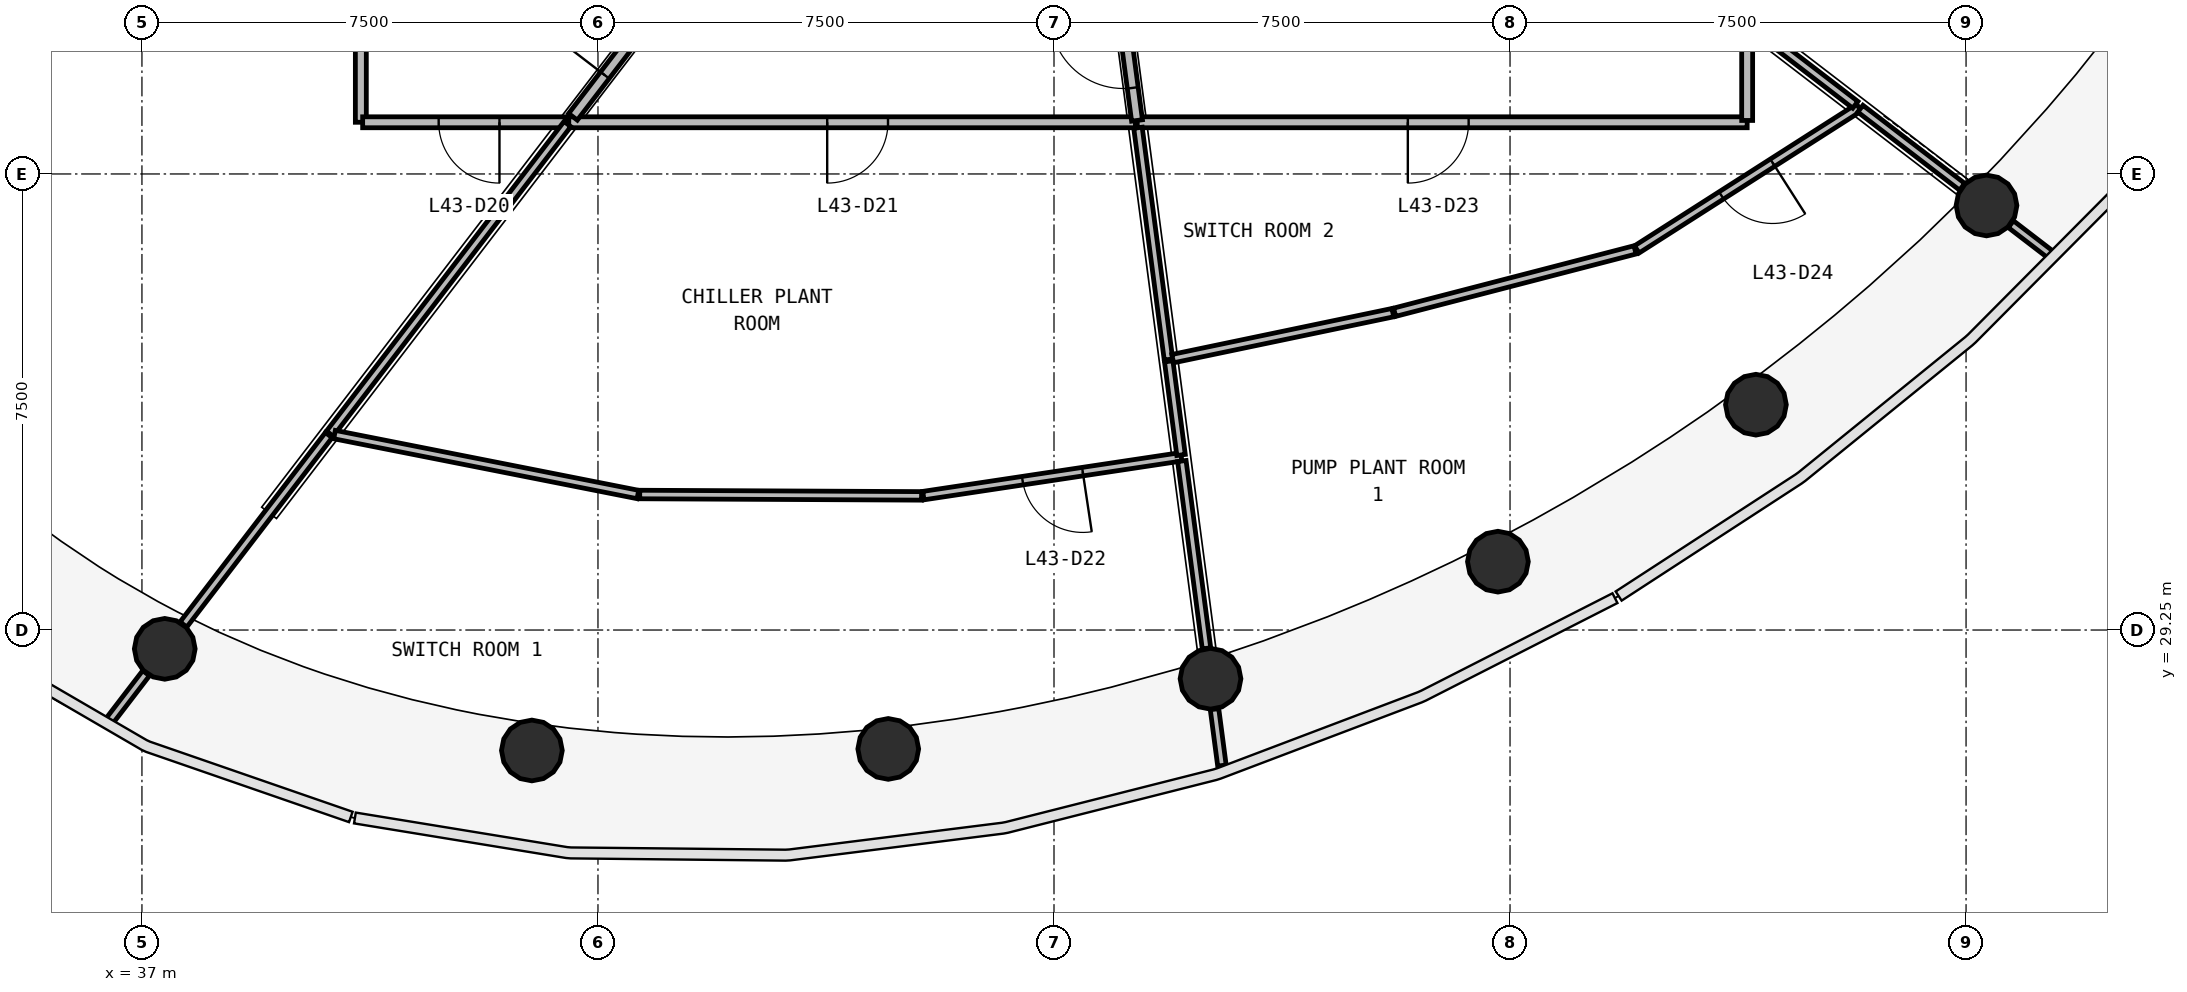
"""IFC4 building model, lengths in metres.
Left out: names, types, materials, properties, quantities, classifications, styles, units other than length and angle.
Written with IfcOpenShell. Run it as: python <this file> out.ifc"""

import sys

from ifc_helpers import new_model, si_unit, direction, frame, frame_2d, origin, origin_2d, place, context, subcontext, project, spatial, rectangle, circle, extrude, source, transform, mapped, element, fill, save


model = new_model("IFC4")
c1 = context("Model", 3, precision=1e-05, world=origin(), true_north=direction((0.0, 1.0)))
c2 = subcontext(c1, "Body", "Model", "MODEL_VIEW")
j1 = project(units=[si_unit("LENGTHUNIT", "METRE"), si_unit("PLANEANGLEUNIT", "RADIAN")], contexts=[c1])
p1 = place(None, origin())
s1 = spatial("IfcSite", under=j1, at=p1, CompositionType="ELEMENT")
p2 = place(p1, origin())
s2 = spatial("IfcBuilding", under=s1, at=p2, CompositionType="ELEMENT")
p3 = place(p2, frame((0.0, 0.0, 179.9)))
s3 = spatial("IfcBuildingStorey", under=s2, at=p3, CompositionType="ELEMENT", Elevation=179.9)
m1 = source(origin(), c2, "Body", "SweptSolid", [
    extrude(circle(Radius=0.5, at=origin_2d()), origin(), (0.0, 0.0, 1.0), 3.58),
])
for number, where, z_axis, x_axis in (
    (1, (37.375, 28.94, 0.0), (0.0, 0.0, 1.0), (1.0, 0.0, 0.0)),
    (2, (43.413, 27.269, 0.0), (0.0, 0.0, 1.0), (1.0, 0.0, 0.0)),
    (3, (49.274, 27.295, 0.0), (0.0, 0.0, 1.0), (1.0, 0.0, 0.0)),
    (4, (54.574, 28.449, 0.0), (0.0, 0.0, 1.0), (1.0, 0.0, 0.0)),
    (5, (59.301, 30.374, 0.0), (0.0, 0.0, 1.0), (1.0, 0.0, 0.0)),
    (6, (63.544, 32.956, 0.0), (0.0, 0.0, 1.0), (1.0, 0.0, 0.0)),
    (7, (67.336, 36.232, 0.0), (0.0, 0.0, 1.0), (1.0, 0.0, 0.0)),
):
    element("IfcColumn", number, at=place(p3, frame(where, z_axis=z_axis, x_axis=x_axis)), inside=s3, PredefinedType="COLUMN", context=c2, shape_type="MappedRepresentation", body=[
        mapped(m1, transform((0.0, 0.0, 0.0), scale=1.0)),
    ])
p4 = place(p3, frame((63.4, 37.6, 0.0), z_axis=(0.0, 0.0, 1.0), x_axis=(-1.0, 0.0, 0.0)))
e8 = element("IfcWall", 8, at=p4, inside=s3, PredefinedType="PARTITIONING", context=c2, shape_type="SweptSolid", body=[
    extrude(rectangle(XDim=10.031, YDim=0.18, at=frame_2d((5.015, 0.0))), origin(), (0.0, 0.0, 1.0), 2.38),
])
p5 = place(p4, frame((4.581, 0.0, 0.0)))
e9 = element("IfcOpeningElement", 9, at=p5, cuts=e8, PredefinedType="OPENING", context=c2, shape_type="SweptSolid", body=[
    extrude(rectangle(XDim=1.0, YDim=2.1, at=frame_2d((0.5, 1.05))), frame((0.0, 0.1, 0.0), z_axis=(0.0, -1.0, 0.0), x_axis=(1.0, 0.0, 0.0)), (0.0, 0.0, 1.0), 0.2),
])
p6 = place(p3, frame((53.339, 37.6, 0.0), z_axis=(0.0, 0.0, 1.0), x_axis=(-1.0, 0.0, 0.0)))
e10 = element("IfcWall", 10, at=p6, inside=s3, PredefinedType="PARTITIONING", context=c2, shape_type="SweptSolid", body=[
    extrude(rectangle(XDim=9.319, YDim=0.18, at=frame_2d((4.66, 0.0))), origin(), (0.0, 0.0, 1.0), 2.38),
])
p7 = place(p6, frame((4.069, 0.0, 0.0)))
e11 = element("IfcOpeningElement", 11, at=p7, cuts=e10, PredefinedType="OPENING", context=c2, shape_type="SweptSolid", body=[
    extrude(rectangle(XDim=1.0, YDim=2.1, at=frame_2d((0.5, 1.05))), frame((0.0, 0.1, 0.0), z_axis=(0.0, -1.0, 0.0), x_axis=(1.0, 0.0, 0.0)), (0.0, 0.0, 1.0), 0.2),
])
p8 = place(p3, frame((40.6, 46.469, 0.0), z_axis=(0.0, 0.0, 1.0), x_axis=(0.0, -1.0, 0.0)))
e12 = element("IfcWall", 12, at=p8, inside=s3, PredefinedType="PARTITIONING", context=c2, shape_type="SweptSolid", body=[
    extrude(rectangle(XDim=8.869, YDim=0.18, at=frame_2d((4.435, 0.0))), origin(), (0.0, 0.0, 1.0), 2.38),
])
p9 = place(p3, frame((43.99, 37.6, 0.0), z_axis=(0.0, 0.0, 1.0), x_axis=(-1.0, 0.0, 0.0)))
e13 = element("IfcWall", 13, at=p9, inside=s3, PredefinedType="PARTITIONING", context=c2, shape_type="SweptSolid", body=[
    extrude(rectangle(XDim=3.36, YDim=0.18, at=frame_2d((1.68, 0.0))), origin(), (0.0, 0.0, 1.0), 2.38),
])
p10 = place(p9, frame((1.11, 0.0, 0.0)))
e14 = element("IfcOpeningElement", 14, at=p10, cuts=e13, PredefinedType="OPENING", context=c2, shape_type="SweptSolid", body=[
    extrude(rectangle(XDim=1.0, YDim=2.1, at=frame_2d((0.5, 1.05))), frame((0.0, 0.1, 0.0), z_axis=(0.0, -1.0, 0.0), x_axis=(1.0, 0.0, 0.0)), (0.0, 0.0, 1.0), 0.2),
])
p11 = place(p3, frame((44.089, 37.69, 0.0), z_axis=(0.0, 0.0, 1.0), x_axis=(0.608737787706, 0.793371480341, 0.0)))
e15 = element("IfcWall", 15, at=p11, inside=s3, PredefinedType="PARTITIONING", context=c2, shape_type="SweptSolid", body=[
    extrude(rectangle(XDim=2.912, YDim=0.18, at=frame_2d((1.456, 0.0))), origin(), (0.0, 0.0, 1.0), 2.38),
])
p12 = place(p11, frame((0.862, 0.0, 0.0)))
e16 = element("IfcOpeningElement", 16, at=p12, cuts=e15, PredefinedType="OPENING", context=c2, shape_type="SweptSolid", body=[
    extrude(rectangle(XDim=1.2, YDim=2.1, at=frame_2d((0.6, 1.05))), frame((0.0, 0.1, 0.0), z_axis=(0.0, -1.0, 0.0), x_axis=(1.0, 0.0, 0.0)), (0.0, 0.0, 1.0), 0.2),
])
p13 = place(p3, frame((53.365, 37.63, 0.0), z_axis=(0.0, 0.0, 1.0), x_axis=(-0.130504701654, 0.991447690424, 0.0)))
e17 = element("IfcWall", 17, at=p13, inside=s3, PredefinedType="PARTITIONING", context=c2, shape_type="SweptSolid", body=[
    extrude(rectangle(XDim=2.391, YDim=0.18, at=frame_2d((1.195, 0.0))), origin(), (0.0, 0.0, 1.0), 2.38),
])
p14 = place(p13, frame((0.541, 0.0, 0.0)))
e18 = element("IfcOpeningElement", 18, at=p14, cuts=e17, PredefinedType="OPENING", context=c2, shape_type="SweptSolid", body=[
    extrude(rectangle(XDim=1.2, YDim=2.1, at=frame_2d((0.6, 1.05))), frame((0.0, 0.1, 0.0), z_axis=(0.0, -1.0, 0.0), x_axis=(1.0, 0.0, 0.0)), (0.0, 0.0, 1.0), 0.2),
])
p15 = place(p3, frame((63.4, 37.63, 0.0), z_axis=(0.0, 0.0, 1.0), x_axis=(0.0, 1.0, 0.0)))
e19 = element("IfcWall", 19, at=p15, inside=s3, PredefinedType="PARTITIONING", context=c2, shape_type="SweptSolid", body=[
    extrude(rectangle(XDim=1.593, YDim=0.18, at=frame_2d((0.796, 0.0))), origin(), (0.0, 0.0, 1.0), 2.38),
])
p16 = place(p3, frame((43.998, 37.571, 0.0), z_axis=(0.0, 0.0, 1.0), x_axis=(-0.608770902547, -0.7933460709, 0.0)))
e20 = element("IfcWall", 20, at=p16, inside=s3, PredefinedType="PARTITIONING", context=c2, shape_type="SweptSolid", body=[
    extrude(rectangle(XDim=6.418, YDim=0.14, at=frame_2d((3.209, 0.0))), origin(), (0.0, 0.0, 1.0), 2.38),
])
p17 = place(p3, frame((40.167, 32.464, 0.0), z_axis=(0.0, 0.0, 1.0), x_axis=(0.981032247985, -0.193844598618, 0.0)))
e21 = element("IfcWall", 21, at=p17, inside=s3, PredefinedType="PARTITIONING", context=c2, shape_type="SweptSolid", body=[
    extrude(rectangle(XDim=5.086, YDim=0.14, at=frame_2d((2.543, 0.0))), origin(), (0.0, 0.0, 1.0), 2.38),
])
p18 = place(p3, frame((45.187, 31.479, 0.0), z_axis=(0.0, 0.0, 1.0), x_axis=(0.999988261157, -0.004845363671, 0.0)))
e22 = element("IfcWall", 22, at=p18, inside=s3, PredefinedType="PARTITIONING", context=c2, shape_type="SweptSolid", body=[
    extrude(rectangle(XDim=4.635, YDim=0.14, at=frame_2d((2.318, 0.0))), origin(), (0.0, 0.0, 1.0), 2.38),
])
p19 = place(p3, frame((65.238, 37.842, 0.0), z_axis=(0.0, 0.0, 1.0), x_axis=(-0.842765106191, -0.538281502364, 0.0)))
e23 = element("IfcWall", 23, at=p19, inside=s3, PredefinedType="PARTITIONING", context=c2, shape_type="SweptSolid", body=[
    extrude(rectangle(XDim=4.335, YDim=0.14, at=frame_2d((2.167, 0.0))), origin(), (0.0, 0.0, 1.0), 2.38),
])
p20 = place(p19, frame((1.685, 0.0, 0.0)))
e24 = element("IfcOpeningElement", 24, at=p20, cuts=e23, PredefinedType="OPENING", context=c2, shape_type="SweptSolid", body=[
    extrude(rectangle(XDim=1.0, YDim=2.1, at=frame_2d((0.5, 1.05))), frame((0.0, 0.08, 0.0), z_axis=(0.0, -1.0, 0.0), x_axis=(1.0, 0.0, 0.0)), (0.0, 0.0, 1.0), 0.16),
])
p21 = place(p3, frame((54.094, 32.099, 0.0), z_axis=(0.0, 0.0, 1.0), x_axis=(-0.988863178372, -0.148827465407, 0.0)))
e25 = element("IfcWall", 25, at=p21, inside=s3, PredefinedType="PARTITIONING", context=c2, shape_type="SweptSolid", body=[
    extrude(rectangle(XDim=4.29, YDim=0.14, at=frame_2d((2.145, 0.0))), origin(), (0.0, 0.0, 1.0), 2.38),
])
p22 = place(p21, frame((1.64, 0.0, 0.0)))
e26 = element("IfcOpeningElement", 26, at=p22, cuts=e25, PredefinedType="OPENING", context=c2, shape_type="SweptSolid", body=[
    extrude(rectangle(XDim=1.0, YDim=2.1, at=frame_2d((0.5, 1.05))), frame((0.0, 0.08, 0.0), z_axis=(0.0, -1.0, 0.0), x_axis=(1.0, 0.0, 0.0)), (0.0, 0.0, 1.0), 0.16),
])
p23 = place(p3, frame((57.602, 34.476, 0.0), z_axis=(0.0, 0.0, 1.0), x_axis=(0.96794524956, 0.251161290518, 0.0)))
e27 = element("IfcWall", 27, at=p23, inside=s3, PredefinedType="PARTITIONING", context=c2, shape_type="SweptSolid", body=[
    extrude(rectangle(XDim=4.084, YDim=0.14, at=frame_2d((2.042, 0.0))), origin(), (0.0, 0.0, 1.0), 2.38),
])
p24 = place(p3, frame((40.073, 32.456, 0.0), z_axis=(0.0, 0.0, 1.0), x_axis=(-0.608817875064, -0.793310024519, 0.0)))
e28 = element("IfcWall", 28, at=p24, inside=s3, PredefinedType="PARTITIONING", context=c2, shape_type="SweptSolid", body=[
    extrude(rectangle(XDim=3.926, YDim=0.14, at=frame_2d((1.963, 0.0))), origin(), (0.0, 0.0, 1.0), 2.38),
])
p25 = place(p3, frame((53.381, 37.51, 0.0), z_axis=(0.0, 0.0, 1.0), x_axis=(0.130503795096, -0.991447809754, 0.0)))
e29 = element("IfcWall", 29, at=p25, inside=s3, PredefinedType="PARTITIONING", context=c2, shape_type="SweptSolid", body=[
    extrude(rectangle(XDim=3.844, YDim=0.14, at=frame_2d((1.922, 0.0))), origin(), (0.0, 0.0, 1.0), 2.38),
])
p26 = place(p3, frame((53.951, 33.713, 0.0), z_axis=(0.0, 0.0, 1.0), x_axis=(0.978877627359, 0.204447036308, 0.0)))
e30 = element("IfcWall", 30, at=p26, inside=s3, PredefinedType="PARTITIONING", context=c2, shape_type="SweptSolid", body=[
    extrude(rectangle(XDim=3.699, YDim=0.14, at=frame_2d((1.85, 0.0))), origin(), (0.0, 0.0, 1.0), 2.38),
])
p27 = place(p3, frame((54.103, 32.03, 0.0), z_axis=(0.0, 0.0, 1.0), x_axis=(0.130501257376, -0.991448143789, 0.0)))
e31 = element("IfcWall", 31, at=p27, inside=s3, PredefinedType="PARTITIONING", context=c2, shape_type="SweptSolid", body=[
    extrude(rectangle(XDim=3.107, YDim=0.14, at=frame_2d((1.554, 0.0))), origin(), (0.0, 0.0, 1.0), 2.38),
])
p28 = place(p3, frame((63.429, 39.23, 0.0), z_axis=(0.0, 0.0, 1.0), x_axis=(0.793376463814, -0.608731292662, 0.0)))
e32 = element("IfcWall", 32, at=p28, inside=s3, PredefinedType="PARTITIONING", context=c2, shape_type="SweptSolid", body=[
    extrude(rectangle(XDim=2.206, YDim=0.14, at=frame_2d((1.103, 0.0))), origin(), (0.0, 0.0, 1.0), 2.38),
])
p29 = place(p3, frame((65.262, 37.824, 0.0), z_axis=(0.0, 0.0, 1.0), x_axis=(0.793315822565, -0.608810319942, 0.0)))
e33 = element("IfcWall", 33, at=p29, inside=s3, PredefinedType="PARTITIONING", context=c2, shape_type="SweptSolid", body=[
    extrude(rectangle(XDim=2.111, YDim=0.14, at=frame_2d((1.055, 0.0))), origin(), (0.0, 0.0, 1.0), 2.38),
])
p30 = place(p3, frame((53.887, 33.669, 0.0), z_axis=(0.0, 0.0, 1.0), x_axis=(0.130609007081, -0.991433955072, 0.0)))
e34 = element("IfcWall", 34, at=p30, inside=s3, PredefinedType="PARTITIONING", context=c2, shape_type="SweptSolid", body=[
    extrude(rectangle(XDim=1.553, YDim=0.14, at=frame_2d((0.777, 0.0))), origin(), (0.0, 0.0, 1.0), 2.38),
])
p31 = place(p3, frame((37.068, 28.54, 0.0), z_axis=(0.0, 0.0, 1.0), x_axis=(-0.608854774338, -0.793281705175, 0.0)))
e35 = element("IfcWall", 35, at=p31, inside=s3, PredefinedType="PARTITIONING", context=c2, shape_type="SweptSolid", body=[
    extrude(rectangle(XDim=0.993, YDim=0.14, at=frame_2d((0.497, 0.0))), origin(), (0.0, 0.0, 1.0), 2.88),
])
p32 = place(p3, frame((54.64, 27.948, 0.0), z_axis=(0.0, 0.0, 1.0), x_axis=(0.130488267119, -0.99144985357, 0.0)))
e36 = element("IfcWall", 36, at=p32, inside=s3, PredefinedType="PARTITIONING", context=c2, shape_type="SweptSolid", body=[
    extrude(rectangle(XDim=0.936, YDim=0.14, at=frame_2d((0.468, 0.0))), origin(), (0.0, 0.0, 1.0), 2.88),
])
p33 = place(p3, frame((67.737, 35.925, 0.0), z_axis=(0.0, 0.0, 1.0), x_axis=(0.79344724315, -0.608639032873, 0.0)))
e37 = element("IfcWall", 37, at=p33, inside=s3, PredefinedType="PARTITIONING", context=c2, shape_type="SweptSolid", body=[
    extrude(rectangle(XDim=0.815, YDim=0.14, at=frame_2d((0.408, 0.0))), origin(), (0.0, 0.0, 1.0), 2.88),
])
m2 = source(origin(), c2, "Body", "SweptSolid", [
    extrude(rectangle(XDim=1.0, YDim=2.1, at=frame_2d((0.5, 1.05))), frame((0.0, 0.025, 0.0), z_axis=(0.0, -1.0, 0.0), x_axis=(1.0, 0.0, 0.0)), (0.0, 0.0, 1.0), 0.05),
])
p34 = place(p10, origin())
e38 = element("IfcDoor", 38, at=p34, inside=s3, OperationType="SINGLE_SWING_LEFT", PredefinedType="DOOR", context=c2, shape_type="MappedRepresentation", body=[
    mapped(m2, transform((0.0, 0.0, 0.0), scale=1.0)),
])
fill(e14, e38)
p35 = place(p7, origin())
e39 = element("IfcDoor", 39, at=p35, inside=s3, OperationType="SINGLE_SWING_RIGHT", PredefinedType="DOOR", context=c2, shape_type="MappedRepresentation", body=[
    mapped(m2, transform((0.0, 0.0, 0.0), scale=1.0)),
])
fill(e11, e39)
p36 = place(p22, origin())
e40 = element("IfcDoor", 40, at=p36, inside=s3, OperationType="SINGLE_SWING_LEFT", PredefinedType="DOOR", context=c2, shape_type="MappedRepresentation", body=[
    mapped(m2, transform((0.0, 0.0, 0.0), scale=1.0)),
])
fill(e26, e40)
p37 = place(p5, origin())
e41 = element("IfcDoor", 41, at=p37, inside=s3, OperationType="SINGLE_SWING_RIGHT", PredefinedType="DOOR", context=c2, shape_type="MappedRepresentation", body=[
    mapped(m2, transform((0.0, 0.0, 0.0), scale=1.0)),
])
fill(e9, e41)
p38 = place(p20, origin())
e42 = element("IfcDoor", 42, at=p38, inside=s3, OperationType="SINGLE_SWING_LEFT", PredefinedType="DOOR", context=c2, shape_type="MappedRepresentation", body=[
    mapped(m2, transform((0.0, 0.0, 0.0), scale=1.0)),
])
fill(e24, e42)
m3 = source(origin(), c2, "Body", "SweptSolid", [
    extrude(rectangle(XDim=1.2, YDim=2.1, at=frame_2d((0.6, 1.05))), frame((0.0, 0.025, 0.0), z_axis=(0.0, -1.0, 0.0), x_axis=(1.0, 0.0, 0.0)), (0.0, 0.0, 1.0), 0.05),
])
p39 = place(p12, origin())
e43 = element("IfcDoor", 43, at=p39, inside=s3, OperationType="SINGLE_SWING_LEFT", PredefinedType="DOOR", context=c2, shape_type="MappedRepresentation", body=[
    mapped(m3, transform((0.0, 0.0, 0.0), scale=1.0)),
])
fill(e16, e43)
p40 = place(p14, origin())
e44 = element("IfcDoor", 44, at=p40, inside=s3, OperationType="SINGLE_SWING_RIGHT", PredefinedType="DOOR", context=c2, shape_type="MappedRepresentation", body=[
    mapped(m3, transform((0.0, 0.0, 0.0), scale=1.0)),
])
fill(e18, e44)
save(model, sys.argv[1])
